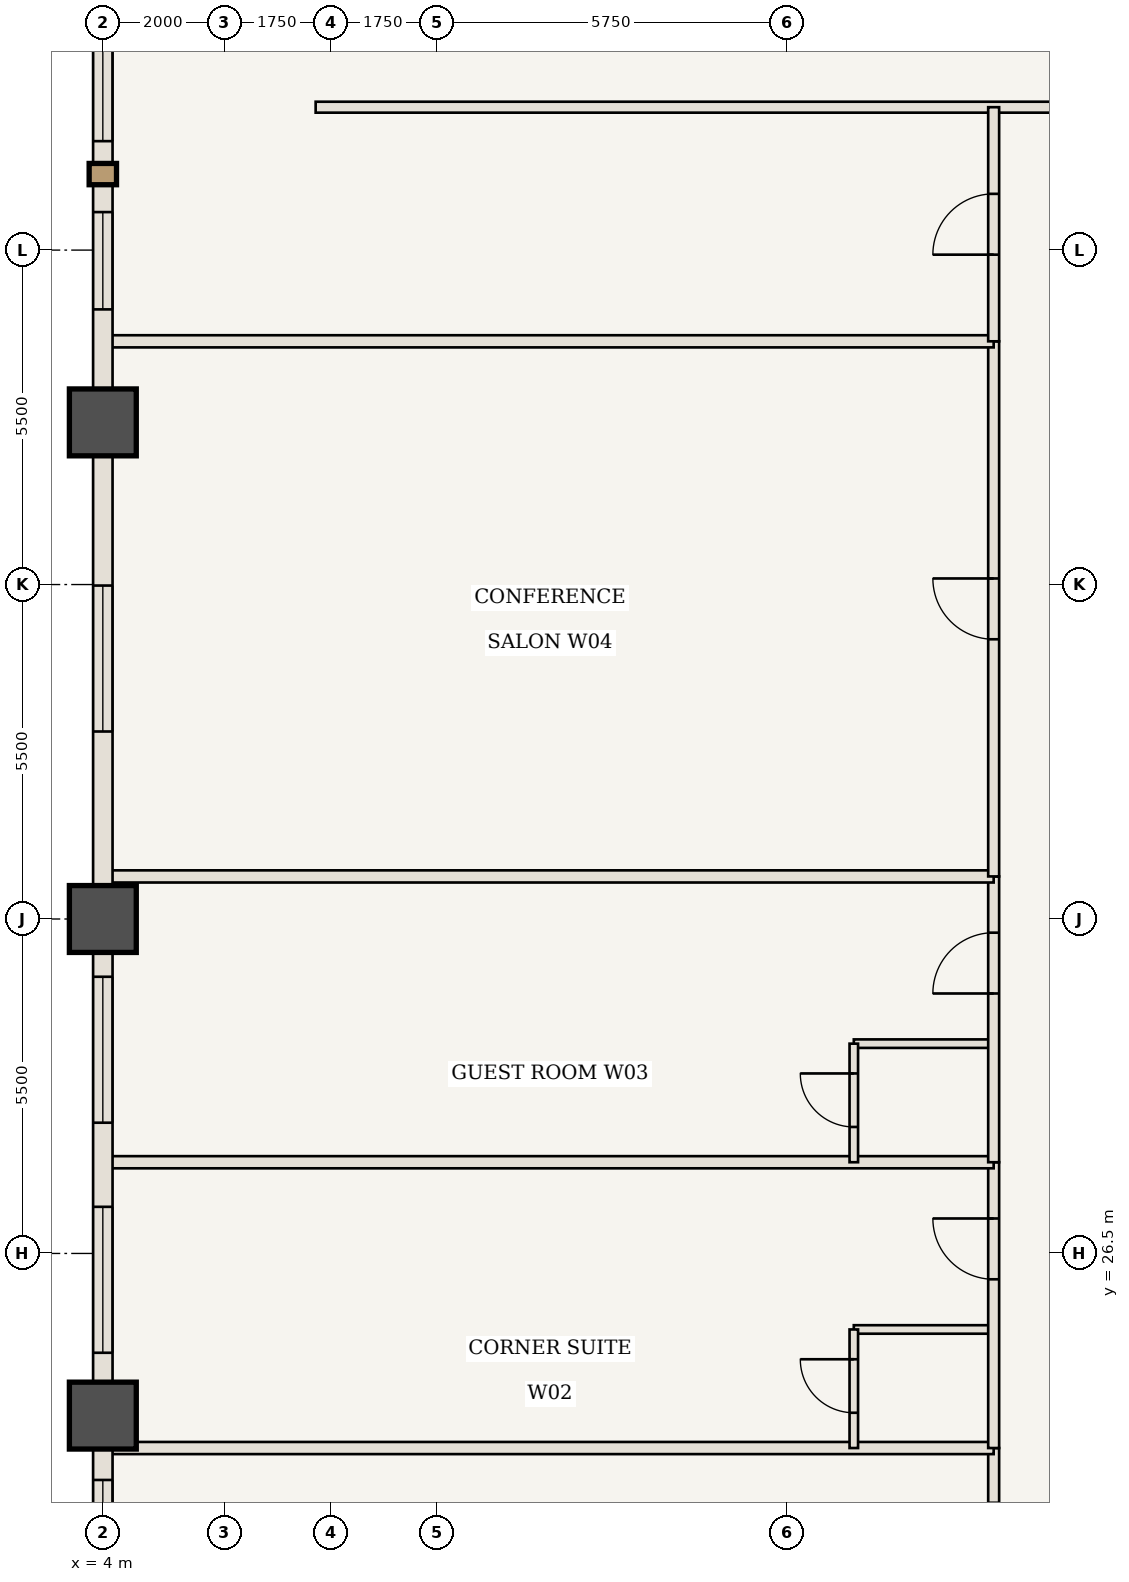
"""IFC4 building model, lengths in metres.
Left out: names, types, materials, properties, quantities, classifications, styles, units other than length and angle.
Written with IfcOpenShell. Run it as: python <this file> out.ifc"""

import sys

from ifc_helpers import new_model, si_unit, direction, frame, frame_2d, origin, origin_2d, place, context, subcontext, project, spatial, rectangle, extrude, element, fill, save


model = new_model("IFC4")
c1 = context("Model", 3, precision=1e-05, world=origin(), true_north=direction((0.0, 1.0)))
c2 = subcontext(c1, "Body", "Model", "MODEL_VIEW")
j1 = project(units=[si_unit("LENGTHUNIT", "METRE"), si_unit("PLANEANGLEUNIT", "RADIAN")], contexts=[c1])
p1 = place(None, origin())
s1 = spatial("IfcSite", under=j1, at=p1, CompositionType="ELEMENT")
p2 = place(p1, origin())
s2 = spatial("IfcBuilding", under=s1, at=p2, CompositionType="ELEMENT")
p3 = place(p2, frame((0.0, 0.0, 63.35)))
s3 = spatial("IfcBuildingStorey", under=s2, at=p3, CompositionType="ELEMENT", Elevation=63.35)
for number, where, z_axis, x_axis in (
    (1, (4.0, 23.833, 0.0), (0.0, 0.0, 1.0), (1.0, 0.0, 0.0)),
    (2, (4.0, 32.0, 0.0), (0.0, 0.0, 1.0), (1.0, 0.0, 0.0)),
    (3, (4.0, 40.167, 0.0), (0.0, 0.0, 1.0), (1.0, 0.0, 0.0)),
):
    element("IfcColumn", number, at=place(p3, frame(where, z_axis=z_axis, x_axis=x_axis)), inside=s3, PredefinedType="COLUMN", context=c2, shape_type="SweptSolid", body=[
        extrude(rectangle(XDim=1.1, YDim=1.1, at=origin_2d()), origin(), (0.0, 0.0, 1.0), 3.5),
    ])
p4 = place(p3, frame((7.5, 45.35, 0.0), z_axis=(0.0, 0.0, 1.0), x_axis=(1.0, 0.0, 0.0)))
e4 = element("IfcWall", 4, at=p4, inside=s3, PredefinedType="STANDARD", context=c2, shape_type="SweptSolid", body=[
    extrude(rectangle(XDim=18.0, YDim=0.18, at=frame_2d((9.0, 0.0))), origin(), (0.0, 0.0, 1.0), 3.32),
])
p5 = place(p4, frame((14.1, 0.0, 0.0)))
e5 = element("IfcOpeningElement", 5, at=p5, cuts=e4, PredefinedType="OPENING", context=c2, shape_type="SweptSolid", body=[
    extrude(rectangle(XDim=1.0, YDim=2.15, at=frame_2d((0.5, 1.075))), frame((0.0, 0.1, 0.0), z_axis=(0.0, -1.0, 0.0), x_axis=(1.0, 0.0, 0.0)), (0.0, 0.0, 1.0), 0.2),
])
p6 = place(p3, frame((18.65, 18.65, 0.0), z_axis=(0.0, 0.0, 1.0), x_axis=(0.0, 1.0, 0.0)))
e6 = element("IfcWall", 6, at=p6, inside=s3, PredefinedType="STANDARD", context=c2, shape_type="SweptSolid", body=[
    extrude(rectangle(XDim=4.65, YDim=0.18, at=frame_2d((2.325, 0.0))), origin(), (0.0, 0.0, 1.0), 3.32),
])
p7 = place(p6, frame((2.75, 0.0, 0.0)))
e7 = element("IfcOpeningElement", 7, at=p7, cuts=e6, PredefinedType="OPENING", context=c2, shape_type="SweptSolid", body=[
    extrude(rectangle(XDim=1.0, YDim=2.15, at=frame_2d((0.5, 1.075))), frame((0.0, 0.1, 0.0), z_axis=(0.0, -1.0, 0.0), x_axis=(1.0, 0.0, 0.0)), (0.0, 0.0, 1.0), 0.2),
])
p8 = place(p3, frame((4.06, 23.3, 0.0), z_axis=(0.0, 0.0, 1.0), x_axis=(1.0, 0.0, 0.0)))
e8 = element("IfcWall", 8, at=p8, inside=s3, PredefinedType="STANDARD", context=c2, shape_type="SweptSolid", body=[
    extrude(rectangle(XDim=14.59, YDim=0.2, at=frame_2d((7.295, 0.0))), origin(), (0.0, 0.0, 1.0), 3.32),
])
p9 = place(p3, frame((16.35, 25.25, 0.0), z_axis=(0.0, 0.0, 1.0), x_axis=(1.0, 0.0, 0.0)))
e9 = element("IfcWall", 9, at=p9, inside=s3, PredefinedType="STANDARD", context=c2, shape_type="SweptSolid", body=[
    extrude(rectangle(XDim=2.3, YDim=0.14, at=frame_2d((1.15, 0.0))), origin(), (0.0, 0.0, 1.0), 3.32),
])
p10 = place(p3, frame((16.35, 23.3, 0.0), z_axis=(0.0, 0.0, 1.0), x_axis=(0.0, 1.0, 0.0)))
e10 = element("IfcWall", 10, at=p10, inside=s3, PredefinedType="STANDARD", context=c2, shape_type="SweptSolid", body=[
    extrude(rectangle(XDim=1.95, YDim=0.14, at=frame_2d((0.975, 0.0))), origin(), (0.0, 0.0, 1.0), 3.32),
])
p11 = place(p10, frame((0.58, 0.0, 0.0)))
e11 = element("IfcOpeningElement", 11, at=p11, cuts=e10, PredefinedType="OPENING", context=c2, shape_type="SweptSolid", body=[
    extrude(rectangle(XDim=0.88, YDim=2.1, at=frame_2d((0.44, 1.05))), frame((0.0, 0.08, 0.0), z_axis=(0.0, -1.0, 0.0), x_axis=(1.0, 0.0, 0.0)), (0.0, 0.0, 1.0), 0.16),
])
p12 = place(p3, frame((18.65, 23.3, 0.0), z_axis=(0.0, 0.0, 1.0), x_axis=(0.0, 1.0, 0.0)))
e12 = element("IfcWall", 12, at=p12, inside=s3, PredefinedType="STANDARD", context=c2, shape_type="SweptSolid", body=[
    extrude(rectangle(XDim=4.7, YDim=0.18, at=frame_2d((2.35, 0.0))), origin(), (0.0, 0.0, 1.0), 3.32),
])
p13 = place(p12, frame((2.775, 0.0, 0.0)))
e13 = element("IfcOpeningElement", 13, at=p13, cuts=e12, PredefinedType="OPENING", context=c2, shape_type="SweptSolid", body=[
    extrude(rectangle(XDim=1.0, YDim=2.15, at=frame_2d((0.5, 1.075))), frame((0.0, 0.1, 0.0), z_axis=(0.0, -1.0, 0.0), x_axis=(1.0, 0.0, 0.0)), (0.0, 0.0, 1.0), 0.2),
])
p14 = place(p3, frame((4.06, 28.0, 0.0), z_axis=(0.0, 0.0, 1.0), x_axis=(1.0, 0.0, 0.0)))
e14 = element("IfcWall", 14, at=p14, inside=s3, PredefinedType="STANDARD", context=c2, shape_type="SweptSolid", body=[
    extrude(rectangle(XDim=14.59, YDim=0.2, at=frame_2d((7.295, 0.0))), origin(), (0.0, 0.0, 1.0), 3.32),
])
p15 = place(p3, frame((16.35, 29.95, 0.0), z_axis=(0.0, 0.0, 1.0), x_axis=(1.0, 0.0, 0.0)))
e15 = element("IfcWall", 15, at=p15, inside=s3, PredefinedType="STANDARD", context=c2, shape_type="SweptSolid", body=[
    extrude(rectangle(XDim=2.3, YDim=0.14, at=frame_2d((1.15, 0.0))), origin(), (0.0, 0.0, 1.0), 3.32),
])
p16 = place(p3, frame((16.35, 28.0, 0.0), z_axis=(0.0, 0.0, 1.0), x_axis=(0.0, 1.0, 0.0)))
e16 = element("IfcWall", 16, at=p16, inside=s3, PredefinedType="STANDARD", context=c2, shape_type="SweptSolid", body=[
    extrude(rectangle(XDim=1.95, YDim=0.14, at=frame_2d((0.975, 0.0))), origin(), (0.0, 0.0, 1.0), 3.32),
])
p17 = place(p16, frame((0.58, 0.0, 0.0)))
e17 = element("IfcOpeningElement", 17, at=p17, cuts=e16, PredefinedType="OPENING", context=c2, shape_type="SweptSolid", body=[
    extrude(rectangle(XDim=0.88, YDim=2.1, at=frame_2d((0.44, 1.05))), frame((0.0, 0.08, 0.0), z_axis=(0.0, -1.0, 0.0), x_axis=(1.0, 0.0, 0.0)), (0.0, 0.0, 1.0), 0.16),
])
p18 = place(p3, frame((18.65, 28.0, 0.0), z_axis=(0.0, 0.0, 1.0), x_axis=(0.0, 1.0, 0.0)))
e18 = element("IfcWall", 18, at=p18, inside=s3, PredefinedType="STANDARD", context=c2, shape_type="SweptSolid", body=[
    extrude(rectangle(XDim=4.7, YDim=0.18, at=frame_2d((2.35, 0.0))), origin(), (0.0, 0.0, 1.0), 3.32),
])
p19 = place(p18, frame((2.775, 0.0, 0.0)))
e19 = element("IfcOpeningElement", 19, at=p19, cuts=e18, PredefinedType="OPENING", context=c2, shape_type="SweptSolid", body=[
    extrude(rectangle(XDim=1.0, YDim=2.15, at=frame_2d((0.5, 1.075))), frame((0.0, 0.1, 0.0), z_axis=(0.0, -1.0, 0.0), x_axis=(1.0, 0.0, 0.0)), (0.0, 0.0, 1.0), 0.2),
])
p20 = place(p3, frame((4.06, 32.7, 0.0), z_axis=(0.0, 0.0, 1.0), x_axis=(1.0, 0.0, 0.0)))
e20 = element("IfcWall", 20, at=p20, inside=s3, PredefinedType="STANDARD", context=c2, shape_type="SweptSolid", body=[
    extrude(rectangle(XDim=14.59, YDim=0.2, at=frame_2d((7.295, 0.0))), origin(), (0.0, 0.0, 1.0), 3.32),
])
p21 = place(p3, frame((18.65, 32.7, 0.0), z_axis=(0.0, 0.0, 1.0), x_axis=(0.0, 1.0, 0.0)))
e21 = element("IfcWall", 21, at=p21, inside=s3, PredefinedType="STANDARD", context=c2, shape_type="SweptSolid", body=[
    extrude(rectangle(XDim=8.8, YDim=0.18, at=frame_2d((4.4, 0.0))), origin(), (0.0, 0.0, 1.0), 3.32),
])
p22 = place(p21, frame((3.9, 0.0, 0.0)))
e22 = element("IfcOpeningElement", 22, at=p22, cuts=e21, PredefinedType="OPENING", context=c2, shape_type="SweptSolid", body=[
    extrude(rectangle(XDim=1.0, YDim=2.15, at=frame_2d((0.5, 1.075))), frame((0.0, 0.1, 0.0), z_axis=(0.0, -1.0, 0.0), x_axis=(1.0, 0.0, 0.0)), (0.0, 0.0, 1.0), 0.2),
])
p23 = place(p3, frame((4.06, 41.5, 0.0), z_axis=(0.0, 0.0, 1.0), x_axis=(1.0, 0.0, 0.0)))
e23 = element("IfcWall", 23, at=p23, inside=s3, PredefinedType="STANDARD", context=c2, shape_type="SweptSolid", body=[
    extrude(rectangle(XDim=14.59, YDim=0.2, at=frame_2d((7.295, 0.0))), origin(), (0.0, 0.0, 1.0), 3.32),
])
p24 = place(p3, frame((18.65, 41.5, 0.0), z_axis=(0.0, 0.0, 1.0), x_axis=(0.0, 1.0, 0.0)))
e24 = element("IfcWall", 24, at=p24, inside=s3, PredefinedType="STANDARD", context=c2, shape_type="SweptSolid", body=[
    extrude(rectangle(XDim=3.85, YDim=0.18, at=frame_2d((1.925, 0.0))), origin(), (0.0, 0.0, 1.0), 3.32),
])
p25 = place(p24, frame((1.425, 0.0, 0.0)))
e25 = element("IfcOpeningElement", 25, at=p25, cuts=e24, PredefinedType="OPENING", context=c2, shape_type="SweptSolid", body=[
    extrude(rectangle(XDim=1.0, YDim=2.15, at=frame_2d((0.5, 1.075))), frame((0.0, 0.1, 0.0), z_axis=(0.0, -1.0, 0.0), x_axis=(1.0, 0.0, 0.0)), (0.0, 0.0, 1.0), 0.2),
])
p26 = place(p3, frame((4.0, 15.667, 0.0), z_axis=(0.0, 0.0, 1.0), x_axis=(0.0, 1.0, 0.0)))
e26 = element("IfcWall", 26, at=p26, inside=s3, PredefinedType="USERDEFINED", context=c2, shape_type="SweptSolid", body=[
    extrude(rectangle(XDim=8.167, YDim=0.32, at=frame_2d((4.083, 0.0))), origin(), (0.0, 0.0, 1.0), 2.52),
])
p27 = place(p26, frame((0.742, 0.0, 0.85)))
e27 = element("IfcOpeningElement", 27, at=p27, cuts=e26, PredefinedType="OPENING", context=c2, shape_type="SweptSolid", body=[
    extrude(rectangle(XDim=2.8, YDim=1.47, at=frame_2d((1.4, 0.735))), frame((0.0, 0.17, 0.0), z_axis=(0.0, -1.0, 0.0), x_axis=(1.0, 0.0, 0.0)), (0.0, 0.0, 1.0), 0.34),
])
p28 = place(p26, frame((4.708, 0.0, 0.85)))
e28 = element("IfcOpeningElement", 28, at=p28, cuts=e26, PredefinedType="OPENING", context=c2, shape_type="SweptSolid", body=[
    extrude(rectangle(XDim=2.4, YDim=1.47, at=frame_2d((1.2, 0.735))), frame((0.0, 0.17, 0.0), z_axis=(0.0, -1.0, 0.0), x_axis=(1.0, 0.0, 0.0)), (0.0, 0.0, 1.0), 0.34),
])
p29 = place(p3, frame((4.0, 23.833, 0.0), z_axis=(0.0, 0.0, 1.0), x_axis=(0.0, 1.0, 0.0)))
e29 = element("IfcWall", 29, at=p29, inside=s3, PredefinedType="USERDEFINED", context=c2, shape_type="SweptSolid", body=[
    extrude(rectangle(XDim=8.167, YDim=0.32, at=frame_2d((4.083, 0.0))), origin(), (0.0, 0.0, 1.0), 2.52),
])
p30 = place(p29, frame((1.033, 0.0, 0.85)))
e30 = element("IfcOpeningElement", 30, at=p30, cuts=e29, PredefinedType="OPENING", context=c2, shape_type="SweptSolid", body=[
    extrude(rectangle(XDim=2.4, YDim=1.47, at=frame_2d((1.2, 0.735))), frame((0.0, 0.17, 0.0), z_axis=(0.0, -1.0, 0.0), x_axis=(1.0, 0.0, 0.0)), (0.0, 0.0, 1.0), 0.34),
])
p31 = place(p29, frame((4.817, 0.0, 0.85)))
e31 = element("IfcOpeningElement", 31, at=p31, cuts=e29, PredefinedType="OPENING", context=c2, shape_type="SweptSolid", body=[
    extrude(rectangle(XDim=2.4, YDim=1.47, at=frame_2d((1.2, 0.735))), frame((0.0, 0.17, 0.0), z_axis=(0.0, -1.0, 0.0), x_axis=(1.0, 0.0, 0.0)), (0.0, 0.0, 1.0), 0.34),
])
p32 = place(p3, frame((4.0, 32.0, 0.0), z_axis=(0.0, 0.0, 1.0), x_axis=(0.0, 1.0, 0.0)))
e32 = element("IfcWall", 32, at=p32, inside=s3, PredefinedType="USERDEFINED", context=c2, shape_type="SweptSolid", body=[
    extrude(rectangle(XDim=8.167, YDim=0.32, at=frame_2d((4.083, 0.0))), origin(), (0.0, 0.0, 1.0), 2.52),
])
p33 = place(p32, frame((3.083, 0.0, 0.85)))
e33 = element("IfcOpeningElement", 33, at=p33, cuts=e32, PredefinedType="OPENING", context=c2, shape_type="SweptSolid", body=[
    extrude(rectangle(XDim=2.4, YDim=1.47, at=frame_2d((1.2, 0.735))), frame((0.0, 0.17, 0.0), z_axis=(0.0, -1.0, 0.0), x_axis=(1.0, 0.0, 0.0)), (0.0, 0.0, 1.0), 0.34),
])
p34 = place(p3, frame((4.0, 40.167, 0.0), z_axis=(0.0, 0.0, 1.0), x_axis=(0.0, 1.0, 0.0)))
e34 = element("IfcWall", 34, at=p34, inside=s3, PredefinedType="USERDEFINED", context=c2, shape_type="SweptSolid", body=[
    extrude(rectangle(XDim=8.167, YDim=0.32, at=frame_2d((4.083, 0.0))), origin(), (0.0, 0.0, 1.0), 2.52),
])
p35 = place(p34, frame((1.858, 0.0, 0.85)))
e35 = element("IfcOpeningElement", 35, at=p35, cuts=e34, PredefinedType="OPENING", context=c2, shape_type="SweptSolid", body=[
    extrude(rectangle(XDim=1.6, YDim=1.47, at=frame_2d((0.8, 0.735))), frame((0.0, 0.17, 0.0), z_axis=(0.0, -1.0, 0.0), x_axis=(1.0, 0.0, 0.0)), (0.0, 0.0, 1.0), 0.34),
])
p36 = place(p34, frame((4.625, 0.0, 0.85)))
e36 = element("IfcOpeningElement", 36, at=p36, cuts=e34, PredefinedType="OPENING", context=c2, shape_type="SweptSolid", body=[
    extrude(rectangle(XDim=2.8, YDim=1.47, at=frame_2d((1.4, 0.735))), frame((0.0, 0.17, 0.0), z_axis=(0.0, -1.0, 0.0), x_axis=(1.0, 0.0, 0.0)), (0.0, 0.0, 1.0), 0.34),
])
p37 = place(p11, origin())
e37 = element("IfcDoor", 37, at=p37, inside=s3, OperationType="SINGLE_SWING_RIGHT", PredefinedType="DOOR", context=c2, shape_type="SweptSolid", body=[
    extrude(rectangle(XDim=0.88, YDim=2.1, at=frame_2d((0.44, 1.05))), frame((0.0, 0.025, 0.0), z_axis=(0.0, -1.0, 0.0), x_axis=(1.0, 0.0, 0.0)), (0.0, 0.0, 1.0), 0.05),
])
fill(e11, e37)
p38 = place(p13, origin())
e38 = element("IfcDoor", 38, at=p38, inside=s3, OperationType="SINGLE_SWING_RIGHT", PredefinedType="DOOR", context=c2, shape_type="SweptSolid", body=[
    extrude(rectangle(XDim=1.0, YDim=2.15, at=frame_2d((0.5, 1.075))), frame((0.0, 0.025, 0.0), z_axis=(0.0, -1.0, 0.0), x_axis=(1.0, 0.0, 0.0)), (0.0, 0.0, 1.0), 0.05),
])
fill(e13, e38)
p39 = place(p17, origin())
e39 = element("IfcDoor", 39, at=p39, inside=s3, OperationType="SINGLE_SWING_RIGHT", PredefinedType="DOOR", context=c2, shape_type="SweptSolid", body=[
    extrude(rectangle(XDim=0.88, YDim=2.1, at=frame_2d((0.44, 1.05))), frame((0.0, 0.025, 0.0), z_axis=(0.0, -1.0, 0.0), x_axis=(1.0, 0.0, 0.0)), (0.0, 0.0, 1.0), 0.05),
])
fill(e17, e39)
p40 = place(p19, origin())
e40 = element("IfcDoor", 40, at=p40, inside=s3, OperationType="SINGLE_SWING_LEFT", PredefinedType="DOOR", context=c2, shape_type="SweptSolid", body=[
    extrude(rectangle(XDim=1.0, YDim=2.15, at=frame_2d((0.5, 1.075))), frame((0.0, 0.025, 0.0), z_axis=(0.0, -1.0, 0.0), x_axis=(1.0, 0.0, 0.0)), (0.0, 0.0, 1.0), 0.05),
])
fill(e19, e40)
p41 = place(p22, origin())
e41 = element("IfcDoor", 41, at=p41, inside=s3, OperationType="SINGLE_SWING_RIGHT", PredefinedType="DOOR", context=c2, shape_type="SweptSolid", body=[
    extrude(rectangle(XDim=1.0, YDim=2.15, at=frame_2d((0.5, 1.075))), frame((0.0, 0.025, 0.0), z_axis=(0.0, -1.0, 0.0), x_axis=(1.0, 0.0, 0.0)), (0.0, 0.0, 1.0), 0.05),
])
fill(e22, e41)
p42 = place(p25, origin())
e42 = element("IfcDoor", 42, at=p42, inside=s3, OperationType="SINGLE_SWING_LEFT", PredefinedType="DOOR", context=c2, shape_type="SweptSolid", body=[
    extrude(rectangle(XDim=1.0, YDim=2.15, at=frame_2d((0.5, 1.075))), frame((0.0, 0.025, 0.0), z_axis=(0.0, -1.0, 0.0), x_axis=(1.0, 0.0, 0.0)), (0.0, 0.0, 1.0), 0.05),
])
fill(e25, e42)
p43 = place(p28, origin())
e43 = element("IfcWindow", 43, at=p43, inside=s3, PartitioningType="SINGLE_PANEL", PredefinedType="WINDOW", context=c2, shape_type="SweptSolid", body=[
    extrude(rectangle(XDim=2.4, YDim=1.47, at=frame_2d((1.2, 0.735))), frame((0.0, 0.03, 0.0), z_axis=(0.0, -1.0, 0.0), x_axis=(1.0, 0.0, 0.0)), (0.0, 0.0, 1.0), 0.06),
])
fill(e28, e43)
p44 = place(p30, origin())
e44 = element("IfcWindow", 44, at=p44, inside=s3, PartitioningType="SINGLE_PANEL", PredefinedType="WINDOW", context=c2, shape_type="SweptSolid", body=[
    extrude(rectangle(XDim=2.4, YDim=1.47, at=frame_2d((1.2, 0.735))), frame((0.0, 0.03, 0.0), z_axis=(0.0, -1.0, 0.0), x_axis=(1.0, 0.0, 0.0)), (0.0, 0.0, 1.0), 0.06),
])
fill(e30, e44)
p45 = place(p31, origin())
e45 = element("IfcWindow", 45, at=p45, inside=s3, PartitioningType="SINGLE_PANEL", PredefinedType="WINDOW", context=c2, shape_type="SweptSolid", body=[
    extrude(rectangle(XDim=2.4, YDim=1.47, at=frame_2d((1.2, 0.735))), frame((0.0, 0.03, 0.0), z_axis=(0.0, -1.0, 0.0), x_axis=(1.0, 0.0, 0.0)), (0.0, 0.0, 1.0), 0.06),
])
fill(e31, e45)
p46 = place(p33, origin())
e46 = element("IfcWindow", 46, at=p46, inside=s3, PartitioningType="SINGLE_PANEL", PredefinedType="WINDOW", context=c2, shape_type="SweptSolid", body=[
    extrude(rectangle(XDim=2.4, YDim=1.47, at=frame_2d((1.2, 0.735))), frame((0.0, 0.03, 0.0), z_axis=(0.0, -1.0, 0.0), x_axis=(1.0, 0.0, 0.0)), (0.0, 0.0, 1.0), 0.06),
])
fill(e33, e46)
p47 = place(p35, origin())
e47 = element("IfcWindow", 47, at=p47, inside=s3, PartitioningType="SINGLE_PANEL", PredefinedType="WINDOW", context=c2, shape_type="SweptSolid", body=[
    extrude(rectangle(XDim=1.6, YDim=1.47, at=frame_2d((0.8, 0.735))), frame((0.0, 0.03, 0.0), z_axis=(0.0, -1.0, 0.0), x_axis=(1.0, 0.0, 0.0)), (0.0, 0.0, 1.0), 0.06),
])
fill(e35, e47)
p48 = place(p36, origin())
e48 = element("IfcWindow", 48, at=p48, inside=s3, PartitioningType="SINGLE_PANEL", PredefinedType="WINDOW", context=c2, shape_type="SweptSolid", body=[
    extrude(rectangle(XDim=2.8, YDim=1.47, at=frame_2d((1.4, 0.735))), frame((0.0, 0.03, 0.0), z_axis=(0.0, -1.0, 0.0), x_axis=(1.0, 0.0, 0.0)), (0.0, 0.0, 1.0), 0.06),
])
fill(e36, e48)
save(model, sys.argv[1])
